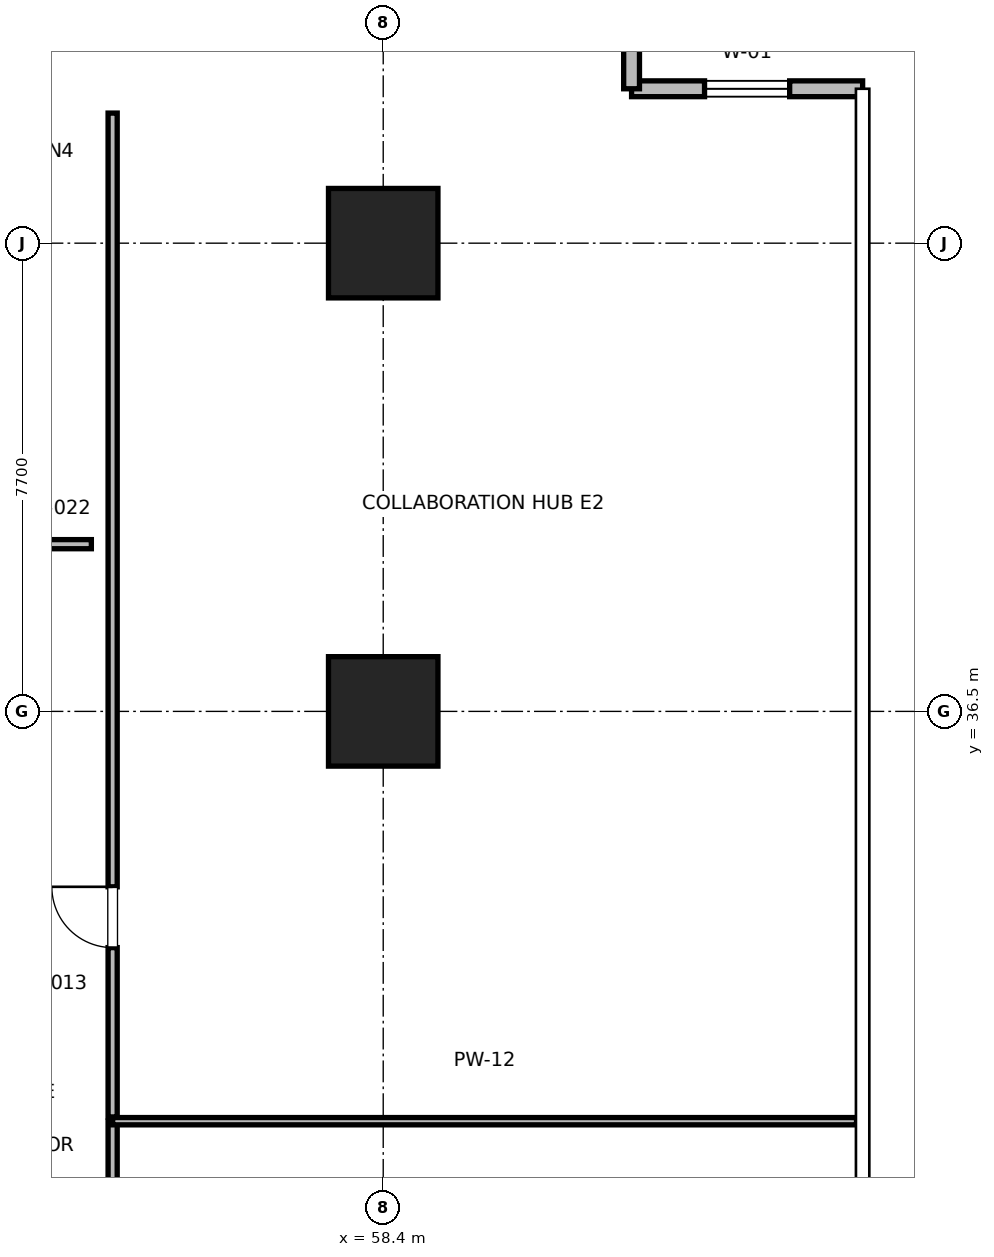
"""IFC4 building model, lengths in metres.
Left out: names, types, materials, properties, quantities, classifications, styles, units other than length and angle.
Written with IfcOpenShell. Run it as: python <this file> out.ifc"""

import sys

from ifc_helpers import new_model, si_unit, direction, frame, frame_2d, origin, origin_2d, place, context, subcontext, project, spatial, rectangle, extrude, element, fill, save


model = new_model("IFC4")
c1 = context("Model", 3, precision=1e-05, world=origin(), true_north=direction((0.0, 1.0)))
c2 = subcontext(c1, "Body", "Model", "MODEL_VIEW")
j1 = project(units=[si_unit("LENGTHUNIT", "METRE"), si_unit("PLANEANGLEUNIT", "RADIAN")], contexts=[c1])
p1 = place(None, origin())
s1 = spatial("IfcSite", under=j1, at=p1, CompositionType="ELEMENT")
p2 = place(p1, origin())
s2 = spatial("IfcBuilding", under=s1, at=p2, CompositionType="ELEMENT")
p3 = place(p2, frame((0.0, 0.0, 83.6)))
s3 = spatial("IfcBuildingStorey", under=s2, at=p3, CompositionType="ELEMENT", Elevation=83.6)
for number, where, z_axis, x_axis in (
    (1, (58.4, 36.5, 0.0), (0.0, 0.0, 1.0), (1.0, 0.0, 0.0)),
    (2, (58.4, 44.2, 0.0), (0.0, 0.0, 1.0), (1.0, 0.0, 0.0)),
):
    element("IfcColumn", number, at=place(p3, frame(where, z_axis=z_axis, x_axis=x_axis)), inside=s3, PredefinedType="COLUMN", context=c2, shape_type="SweptSolid", body=[
        extrude(rectangle(XDim=1.8, YDim=1.8, at=origin_2d()), origin(), (0.0, 0.0, 1.0), 4.0),
    ])
p4 = place(p3, frame((66.285, 46.739, 0.0), z_axis=(0.0, 0.0, 1.0), x_axis=(-1.0, 0.0, 0.0)))
e3 = element("IfcWall", 3, at=p4, inside=s3, PredefinedType="PARAPET", context=c2, shape_type="SweptSolid", body=[
    extrude(rectangle(XDim=3.8, YDim=0.26, at=frame_2d((1.9, 0.0))), origin(), (0.0, 0.0, 1.0), 3.76),
])
p5 = place(p4, frame((1.2, 0.0, 0.85)))
e4 = element("IfcOpeningElement", 4, at=p5, cuts=e3, PredefinedType="OPENING", context=c2, shape_type="SweptSolid", body=[
    extrude(rectangle(XDim=1.4, YDim=2.0, at=frame_2d((0.7, 1.0))), frame((0.0, 0.13, 0.0), z_axis=(0.0, -1.0, 0.0), x_axis=(1.0, 0.0, 0.0)), (0.0, 0.0, 1.0), 0.26),
])
p6 = place(p3, frame((62.485, 46.739, 0.0), z_axis=(0.0, 0.0, 1.0), x_axis=(0.0, 1.0, 0.0)))
e5 = element("IfcWall", 5, at=p6, inside=s3, PredefinedType="PARAPET", context=c2, shape_type="SweptSolid", body=[
    extrude(rectangle(XDim=3.4, YDim=0.26, at=frame_2d((1.7, 0.0))), origin(), (0.0, 0.0, 1.0), 3.76),
])
p7 = place(p3, frame((47.686, 39.25, 0.0), z_axis=(0.0, 0.0, 1.0), x_axis=(1.0, 0.0, 0.0)))
e6 = element("IfcWall", 6, at=p7, inside=s3, PredefinedType="PARTITIONING", context=c2, shape_type="SweptSolid", body=[
    extrude(rectangle(XDim=5.914, YDim=0.15, at=frame_2d((2.957, 0.0))), origin(), (0.0, 0.0, 1.0), 2.85),
])
p8 = place(p7, frame((2.407, 0.0, 0.0)))
e7 = element("IfcOpeningElement", 7, at=p8, cuts=e6, PredefinedType="OPENING", context=c2, shape_type="SweptSolid", body=[
    extrude(rectangle(XDim=1.0, YDim=2.15, at=frame_2d((0.5, 1.075))), frame((0.0, 0.075, 0.0), z_axis=(0.0, -1.0, 0.0), x_axis=(1.0, 0.0, 0.0)), (0.0, 0.0, 1.0), 0.15),
])
p9 = place(p3, frame((53.95, 8.661, 0.0), z_axis=(0.0, 0.0, 1.0), x_axis=(0.0, 1.0, 0.0)))
e8 = element("IfcWall", 8, at=p9, inside=s3, PredefinedType="PARTITIONING", context=c2, shape_type="SweptSolid", body=[
    extrude(rectangle(XDim=21.1, YDim=0.15, at=frame_2d((10.55, 0.0))), origin(), (0.0, 0.0, 1.0), 2.85),
])
p10 = place(p9, frame((14.985, 0.0, 0.0)))
e9 = element("IfcOpeningElement", 9, at=p10, cuts=e8, PredefinedType="OPENING", context=c2, shape_type="SweptSolid", body=[
    extrude(rectangle(XDim=1.0, YDim=2.15, at=frame_2d((0.5, 1.075))), frame((0.0, 0.075, 0.0), z_axis=(0.0, -1.0, 0.0), x_axis=(1.0, 0.0, 0.0)), (0.0, 0.0, 1.0), 0.15),
])
p11 = place(p3, frame((53.95, 29.761, 0.0), z_axis=(0.0, 0.0, 1.0), x_axis=(1.0, 0.0, 0.0)))
e10 = element("IfcWall", 10, at=p11, inside=s3, PredefinedType="PARTITIONING", context=c2, shape_type="SweptSolid", body=[
    extrude(rectangle(XDim=12.235, YDim=0.12, at=frame_2d((6.117, 0.0))), origin(), (0.0, 0.0, 1.0), 2.85),
])
p12 = place(p3, frame((53.95, 29.831, 0.0), z_axis=(0.0, 0.0, 1.0), x_axis=(0.0, 1.0, 0.0)))
e11 = element("IfcWall", 11, at=p12, inside=s3, PredefinedType="PARTITIONING", context=c2, shape_type="SweptSolid", body=[
    extrude(rectangle(XDim=16.508, YDim=0.15, at=frame_2d((8.254, 0.0))), origin(), (0.0, 0.0, 1.0), 2.85),
])
p13 = place(p12, frame((2.785, 0.0, 0.0)))
e12 = element("IfcOpeningElement", 12, at=p13, cuts=e11, PredefinedType="OPENING", context=c2, shape_type="SweptSolid", body=[
    extrude(rectangle(XDim=1.0, YDim=2.15, at=frame_2d((0.5, 1.075))), frame((0.0, 0.075, 0.0), z_axis=(0.0, -1.0, 0.0), x_axis=(1.0, 0.0, 0.0)), (0.0, 0.0, 1.0), 0.15),
])
p14 = place(p5, origin())
e13 = element("IfcWindow", 13, at=p14, inside=s3, PartitioningType="SINGLE_PANEL", PredefinedType="WINDOW", context=c2, shape_type="SweptSolid", body=[
    extrude(rectangle(XDim=1.4, YDim=2.0, at=frame_2d((0.7, 1.0))), frame((0.0, 0.03, 0.0), z_axis=(0.0, -1.0, 0.0), x_axis=(1.0, 0.0, 0.0)), (0.0, 0.0, 1.0), 0.06),
])
fill(e4, e13)
p15 = place(p13, origin())
e14 = element("IfcDoor", 14, at=p15, inside=s3, OperationType="SINGLE_SWING_RIGHT", PredefinedType="DOOR", context=c2, shape_type="SweptSolid", body=[
    extrude(rectangle(XDim=1.0, YDim=2.15, at=frame_2d((0.5, 1.075))), frame((0.0, 0.025, 0.0), z_axis=(0.0, -1.0, 0.0), x_axis=(1.0, 0.0, 0.0)), (0.0, 0.0, 1.0), 0.05),
])
fill(e12, e14)
save(model, sys.argv[1])
